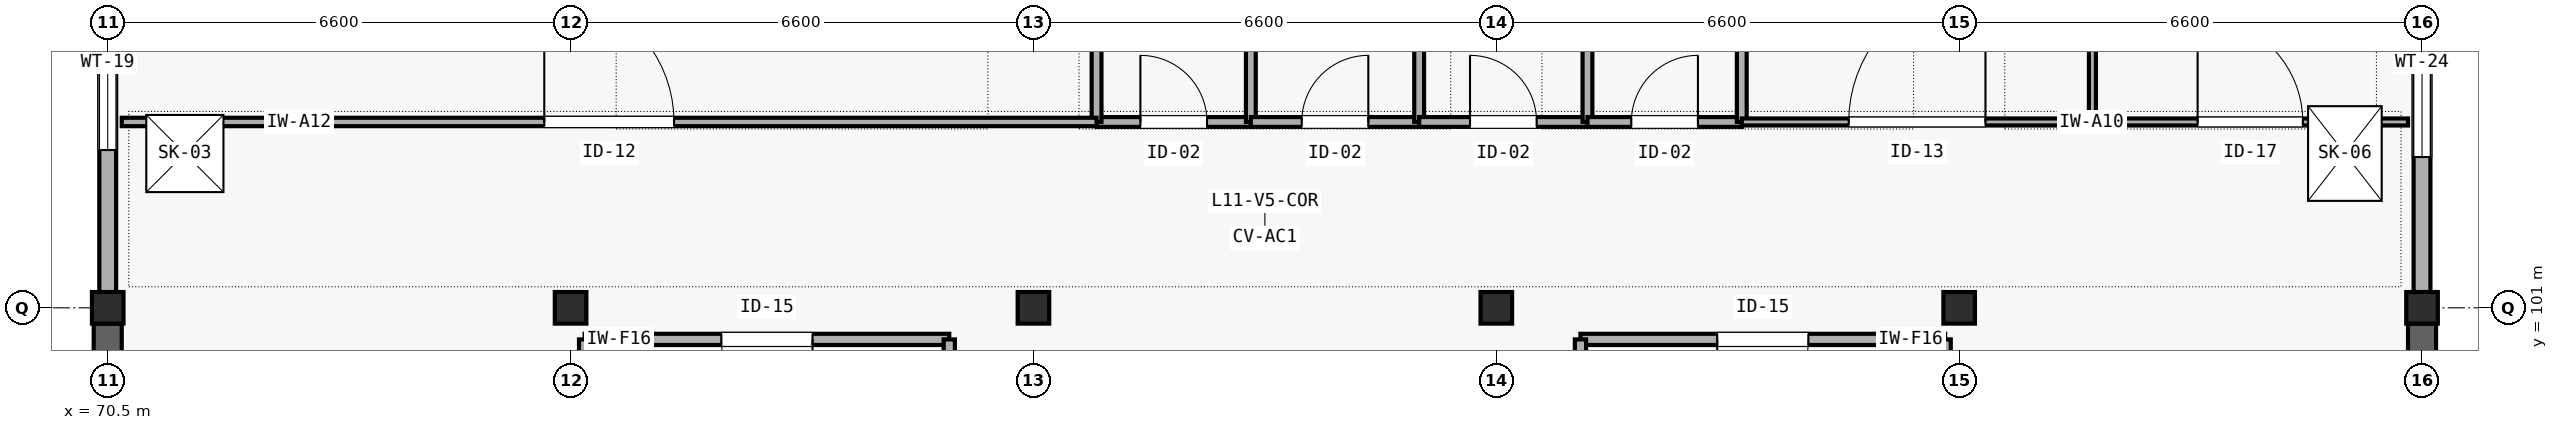
"""IFC4 building model, lengths in metres.
Left out: names, types, materials, properties, quantities, classifications, styles, units other than length and angle.
Written with IfcOpenShell. Run it as: python <this file> out.ifc"""

import sys

from ifc_helpers import new_model, si_unit, direction, frame, frame_2d, origin, origin_2d, place, context, subcontext, project, spatial, rectangle, extrude, element, fill, save


model = new_model("IFC4")
c1 = context("Model", 3, precision=1e-05, world=origin(), true_north=direction((0.0, 1.0)))
c2 = subcontext(c1, "Body", "Model", "MODEL_VIEW")
j1 = project(units=[si_unit("LENGTHUNIT", "METRE"), si_unit("PLANEANGLEUNIT", "RADIAN")], contexts=[c1])
p1 = place(None, origin())
s1 = spatial("IfcSite", under=j1, at=p1, CompositionType="ELEMENT")
p2 = place(p1, origin())
s2 = spatial("IfcBuilding", under=s1, at=p2, CompositionType="ELEMENT")
p3 = place(p2, frame((0.0, 0.0, 46.2)))
s3 = spatial("IfcBuildingStorey", under=s2, at=p3, CompositionType="ELEMENT", Elevation=46.2)
for number, where, z_axis, x_axis in (
    (1, (70.5, 101.0, 0.0), (0.0, 0.0, 1.0), (1.0, 0.0, 0.0)),
    (2, (77.1, 101.0, 0.0), (0.0, 0.0, 1.0), (1.0, 0.0, 0.0)),
    (3, (83.7, 101.0, 0.0), (0.0, 0.0, 1.0), (1.0, 0.0, 0.0)),
    (4, (90.3, 101.0, 0.0), (0.0, 0.0, 1.0), (1.0, 0.0, 0.0)),
    (5, (96.9, 101.0, 0.0), (0.0, 0.0, 1.0), (1.0, 0.0, 0.0)),
    (6, (103.5, 101.0, 0.0), (0.0, 0.0, 1.0), (1.0, 0.0, 0.0)),
):
    element("IfcColumn", number, at=place(p3, frame(where, z_axis=z_axis, x_axis=x_axis)), inside=s3, PredefinedType="COLUMN", context=c2, shape_type="SweptSolid", body=[
        extrude(rectangle(XDim=0.45, YDim=0.45, at=origin_2d()), origin(), (0.0, 0.0, 1.0), 4.2),
    ])
p4 = place(p3, frame((70.5, 97.96, 0.0), z_axis=(0.0, 0.0, 1.0), x_axis=(0.0, 1.0, 0.0)))
e7 = element("IfcWall", 7, at=p4, inside=s3, PredefinedType="SHEAR", context=c2, shape_type="SweptSolid", body=[
    extrude(rectangle(XDim=2.815, YDim=0.4, at=frame_2d((1.407, 0.0))), origin(), (0.0, 0.0, 1.0), 3.85),
])
p5 = place(p3, frame((70.5, 101.225, 0.0), z_axis=(0.0, 0.0, 1.0), x_axis=(0.0, 1.0, 0.0)))
e8 = element("IfcWall", 8, at=p5, inside=s3, PredefinedType="SOLIDWALL", context=c2, shape_type="SweptSolid", body=[
    extrude(rectangle(XDim=6.55, YDim=0.24, at=frame_2d((3.275, 0.0))), origin(), (0.0, 0.0, 1.0), 3.313),
])
p6 = place(p5, frame((2.025, 0.0, 0.85)))
e9 = element("IfcOpeningElement", 9, at=p6, cuts=e8, PredefinedType="OPENING", context=c2, shape_type="SweptSolid", body=[
    extrude(rectangle(XDim=2.5, YDim=1.25, at=frame_2d((1.25, 0.625))), frame((0.0, 0.13, 0.0), z_axis=(0.0, -1.0, 0.0), x_axis=(1.0, 0.0, 0.0)), (0.0, 0.0, 1.0), 0.26),
])
p7 = place(p3, frame((103.5, 97.96, 0.0), z_axis=(0.0, 0.0, 1.0), x_axis=(0.0, 1.0, 0.0)))
e10 = element("IfcWall", 10, at=p7, inside=s3, PredefinedType="SHEAR", context=c2, shape_type="SweptSolid", body=[
    extrude(rectangle(XDim=2.815, YDim=0.4, at=frame_2d((1.407, 0.0))), origin(), (0.0, 0.0, 1.0), 3.85),
])
p8 = place(p3, frame((103.5, 101.225, 0.0), z_axis=(0.0, 0.0, 1.0), x_axis=(0.0, 1.0, 0.0)))
e11 = element("IfcWall", 11, at=p8, inside=s3, PredefinedType="SOLIDWALL", context=c2, shape_type="SweptSolid", body=[
    extrude(rectangle(XDim=6.55, YDim=0.24, at=frame_2d((3.275, 0.0))), origin(), (0.0, 0.0, 1.0), 3.247),
])
p9 = place(p8, frame((1.925, 0.0, 0.85)))
e12 = element("IfcOpeningElement", 12, at=p9, cuts=e11, PredefinedType="OPENING", context=c2, shape_type="SweptSolid", body=[
    extrude(rectangle(XDim=2.7, YDim=1.6, at=frame_2d((1.35, 0.8))), frame((0.0, 0.13, 0.0), z_axis=(0.0, -1.0, 0.0), x_axis=(1.0, 0.0, 0.0)), (0.0, 0.0, 1.0), 0.26),
])
p10 = place(p3, frame((77.3, 100.55, 0.0), z_axis=(0.0, 0.0, 1.0), x_axis=(1.0, 0.0, 0.0)))
e13 = element("IfcWall", 13, at=p10, inside=s3, PredefinedType="SOLIDWALL", context=c2, shape_type="SweptSolid", body=[
    extrude(rectangle(XDim=5.2, YDim=0.16, at=frame_2d((2.6, 0.0))), origin(), (0.0, 0.0, 1.0), 3.9),
])
p11 = place(p10, frame((1.95, 0.0, 0.0)))
e14 = element("IfcOpeningElement", 14, at=p11, cuts=e13, PredefinedType="OPENING", context=c2, shape_type="SweptSolid", body=[
    extrude(rectangle(XDim=1.3, YDim=2.15, at=frame_2d((0.65, 1.075))), frame((0.0, 0.09, 0.0), z_axis=(0.0, -1.0, 0.0), x_axis=(1.0, 0.0, 0.0)), (0.0, 0.0, 1.0), 0.18),
])
p12 = place(p3, frame((77.3, 97.5, 0.0), z_axis=(0.0, 0.0, 1.0), x_axis=(0.0, 1.0, 0.0)))
e15 = element("IfcWall", 15, at=p12, inside=s3, PredefinedType="SOLIDWALL", context=c2, shape_type="SweptSolid", body=[
    extrude(rectangle(XDim=3.05, YDim=0.16, at=frame_2d((1.525, 0.0))), origin(), (0.0, 0.0, 1.0), 3.405),
])
p13 = place(p3, frame((82.5, 97.5, 0.0), z_axis=(0.0, 0.0, 1.0), x_axis=(0.0, 1.0, 0.0)))
e16 = element("IfcWall", 16, at=p13, inside=s3, PredefinedType="SOLIDWALL", context=c2, shape_type="SweptSolid", body=[
    extrude(rectangle(XDim=3.05, YDim=0.16, at=frame_2d((1.525, 0.0))), origin(), (0.0, 0.0, 1.0), 3.9),
])
p14 = place(p3, frame((91.5, 100.55, 0.0), z_axis=(0.0, 0.0, 1.0), x_axis=(1.0, 0.0, 0.0)))
e17 = element("IfcWall", 17, at=p14, inside=s3, PredefinedType="SOLIDWALL", context=c2, shape_type="SweptSolid", body=[
    extrude(rectangle(XDim=5.2, YDim=0.16, at=frame_2d((2.6, 0.0))), origin(), (0.0, 0.0, 1.0), 3.9),
])
p15 = place(p14, frame((1.95, 0.0, 0.0)))
e18 = element("IfcOpeningElement", 18, at=p15, cuts=e17, PredefinedType="OPENING", context=c2, shape_type="SweptSolid", body=[
    extrude(rectangle(XDim=1.3, YDim=2.15, at=frame_2d((0.65, 1.075))), frame((0.0, 0.09, 0.0), z_axis=(0.0, -1.0, 0.0), x_axis=(1.0, 0.0, 0.0)), (0.0, 0.0, 1.0), 0.18),
])
p16 = place(p3, frame((91.5, 97.5, 0.0), z_axis=(0.0, 0.0, 1.0), x_axis=(0.0, 1.0, 0.0)))
e19 = element("IfcWall", 19, at=p16, inside=s3, PredefinedType="SOLIDWALL", context=c2, shape_type="SweptSolid", body=[
    extrude(rectangle(XDim=3.05, YDim=0.16, at=frame_2d((1.525, 0.0))), origin(), (0.0, 0.0, 1.0), 3.9),
])
p17 = place(p3, frame((96.7, 97.5, 0.0), z_axis=(0.0, 0.0, 1.0), x_axis=(0.0, 1.0, 0.0)))
e20 = element("IfcWall", 20, at=p17, inside=s3, PredefinedType="SOLIDWALL", context=c2, shape_type="SweptSolid", body=[
    extrude(rectangle(XDim=3.05, YDim=0.16, at=frame_2d((1.525, 0.0))), origin(), (0.0, 0.0, 1.0), 3.405),
])
p18 = place(p3, frame((84.6, 103.65, 0.0), z_axis=(0.0, 0.0, 1.0), x_axis=(1.0, 0.0, 0.0)))
e21 = element("IfcWall", 21, at=p18, inside=s3, PredefinedType="PLUMBINGWALL", context=c2, shape_type="SweptSolid", body=[
    extrude(rectangle(XDim=2.2, YDim=0.14, at=frame_2d((1.1, 0.0))), origin(), (0.0, 0.0, 1.0), 3.9),
])
p19 = place(p18, frame((0.625, 0.0, 0.0)))
e22 = element("IfcOpeningElement", 22, at=p19, cuts=e21, PredefinedType="OPENING", context=c2, shape_type="SweptSolid", body=[
    extrude(rectangle(XDim=0.95, YDim=2.1, at=frame_2d((0.475, 1.05))), frame((0.0, 0.08, 0.0), z_axis=(0.0, -1.0, 0.0), x_axis=(1.0, 0.0, 0.0)), (0.0, 0.0, 1.0), 0.16),
])
for number, where, z_axis, x_axis in (
    (23, (84.6, 103.65, 0.0), (0.0, 0.0, 1.0), (0.0, 1.0, 0.0)),
    (24, (86.8, 103.65, 0.0), (0.0, 0.0, 1.0), (0.0, 1.0, 0.0)),
):
    element("IfcWall", number, at=place(p3, frame(where, z_axis=z_axis, x_axis=x_axis)), inside=s3, PredefinedType="PLUMBINGWALL", context=c2, shape_type="SweptSolid", body=[
        extrude(rectangle(XDim=4.15, YDim=0.14, at=frame_2d((2.075, 0.0))), origin(), (0.0, 0.0, 1.0), 3.9),
    ])
p20 = place(p3, frame((86.8, 103.65, 0.0), z_axis=(0.0, 0.0, 1.0), x_axis=(1.0, 0.0, 0.0)))
e25 = element("IfcWall", 25, at=p20, inside=s3, PredefinedType="PLUMBINGWALL", context=c2, shape_type="SweptSolid", body=[
    extrude(rectangle(XDim=2.4, YDim=0.14, at=frame_2d((1.2, 0.0))), origin(), (0.0, 0.0, 1.0), 3.9),
])
p21 = place(p20, frame((0.725, 0.0, 0.0)))
e26 = element("IfcOpeningElement", 26, at=p21, cuts=e25, PredefinedType="OPENING", context=c2, shape_type="SweptSolid", body=[
    extrude(rectangle(XDim=0.95, YDim=2.1, at=frame_2d((0.475, 1.05))), frame((0.0, 0.08, 0.0), z_axis=(0.0, -1.0, 0.0), x_axis=(1.0, 0.0, 0.0)), (0.0, 0.0, 1.0), 0.16),
])
p22 = place(p3, frame((89.2, 103.65, 0.0), z_axis=(0.0, 0.0, 1.0), x_axis=(0.0, 1.0, 0.0)))
e27 = element("IfcWall", 27, at=p22, inside=s3, PredefinedType="PLUMBINGWALL", context=c2, shape_type="SweptSolid", body=[
    extrude(rectangle(XDim=4.15, YDim=0.14, at=frame_2d((2.075, 0.0))), origin(), (0.0, 0.0, 1.0), 3.9),
])
p23 = place(p3, frame((89.2, 103.65, 0.0), z_axis=(0.0, 0.0, 1.0), x_axis=(1.0, 0.0, 0.0)))
e28 = element("IfcWall", 28, at=p23, inside=s3, PredefinedType="PLUMBINGWALL", context=c2, shape_type="SweptSolid", body=[
    extrude(rectangle(XDim=2.4, YDim=0.14, at=frame_2d((1.2, 0.0))), origin(), (0.0, 0.0, 1.0), 3.9),
])
p24 = place(p23, frame((0.725, 0.0, 0.0)))
e29 = element("IfcOpeningElement", 29, at=p24, cuts=e28, PredefinedType="OPENING", context=c2, shape_type="SweptSolid", body=[
    extrude(rectangle(XDim=0.95, YDim=2.1, at=frame_2d((0.475, 1.05))), frame((0.0, 0.08, 0.0), z_axis=(0.0, -1.0, 0.0), x_axis=(1.0, 0.0, 0.0)), (0.0, 0.0, 1.0), 0.16),
])
p25 = place(p3, frame((91.6, 103.65, 0.0), z_axis=(0.0, 0.0, 1.0), x_axis=(0.0, 1.0, 0.0)))
e30 = element("IfcWall", 30, at=p25, inside=s3, PredefinedType="PLUMBINGWALL", context=c2, shape_type="SweptSolid", body=[
    extrude(rectangle(XDim=4.15, YDim=0.14, at=frame_2d((2.075, 0.0))), origin(), (0.0, 0.0, 1.0), 3.9),
])
p26 = place(p3, frame((91.6, 103.65, 0.0), z_axis=(0.0, 0.0, 1.0), x_axis=(1.0, 0.0, 0.0)))
e31 = element("IfcWall", 31, at=p26, inside=s3, PredefinedType="PLUMBINGWALL", context=c2, shape_type="SweptSolid", body=[
    extrude(rectangle(XDim=2.2, YDim=0.14, at=frame_2d((1.1, 0.0))), origin(), (0.0, 0.0, 1.0), 3.9),
])
p27 = place(p26, frame((0.625, 0.0, 0.0)))
e32 = element("IfcOpeningElement", 32, at=p27, cuts=e31, PredefinedType="OPENING", context=c2, shape_type="SweptSolid", body=[
    extrude(rectangle(XDim=0.95, YDim=2.1, at=frame_2d((0.475, 1.05))), frame((0.0, 0.08, 0.0), z_axis=(0.0, -1.0, 0.0), x_axis=(1.0, 0.0, 0.0)), (0.0, 0.0, 1.0), 0.16),
])
p28 = place(p3, frame((93.8, 103.65, 0.0), z_axis=(0.0, 0.0, 1.0), x_axis=(0.0, 1.0, 0.0)))
e33 = element("IfcWall", 33, at=p28, inside=s3, PredefinedType="PLUMBINGWALL", context=c2, shape_type="SweptSolid", body=[
    extrude(rectangle(XDim=4.15, YDim=0.14, at=frame_2d((2.075, 0.0))), origin(), (0.0, 0.0, 1.0), 3.9),
])
p29 = place(p3, frame((70.7, 103.65, 0.0), z_axis=(0.0, 0.0, 1.0), x_axis=(1.0, 0.0, 0.0)))
e34 = element("IfcWall", 34, at=p29, inside=s3, PredefinedType="PARTITIONING", context=c2, shape_type="SweptSolid", body=[
    extrude(rectangle(XDim=13.9, YDim=0.12, at=frame_2d((6.95, 0.0))), origin(), (0.0, 0.0, 1.0), 3.9),
])
p30 = place(p29, frame((6.025, 0.0, 0.0)))
e35 = element("IfcOpeningElement", 35, at=p30, cuts=e34, PredefinedType="OPENING", context=c2, shape_type="SweptSolid", body=[
    extrude(rectangle(XDim=1.85, YDim=2.3, at=frame_2d((0.925, 1.15))), frame((0.0, 0.07, 0.0), z_axis=(0.0, -1.0, 0.0), x_axis=(1.0, 0.0, 0.0)), (0.0, 0.0, 1.0), 0.14),
])
p31 = place(p3, frame((93.8, 103.65, 0.0), z_axis=(0.0, 0.0, 1.0), x_axis=(1.0, 0.0, 0.0)))
e36 = element("IfcWall", 36, at=p31, inside=s3, PredefinedType="PARTITIONING", context=c2, shape_type="SweptSolid", body=[
    extrude(rectangle(XDim=5.0, YDim=0.1, at=frame_2d((2.5, 0.0))), origin(), (0.0, 0.0, 1.0), 3.9),
])
p32 = place(p31, frame((1.525, 0.0, 0.0)))
e37 = element("IfcOpeningElement", 37, at=p32, cuts=e36, PredefinedType="OPENING", context=c2, shape_type="SweptSolid", body=[
    extrude(rectangle(XDim=1.95, YDim=2.3, at=frame_2d((0.975, 1.15))), frame((0.0, 0.06, 0.0), z_axis=(0.0, -1.0, 0.0), x_axis=(1.0, 0.0, 0.0)), (0.0, 0.0, 1.0), 0.12),
])
p33 = place(p3, frame((98.8, 103.65, 0.0), z_axis=(0.0, 0.0, 1.0), x_axis=(0.0, 1.0, 0.0)))
e38 = element("IfcWall", 38, at=p33, inside=s3, PredefinedType="PARTITIONING", context=c2, shape_type="SweptSolid", body=[
    extrude(rectangle(XDim=11.15, YDim=0.1, at=frame_2d((5.575, 0.0))), origin(), (0.0, 0.0, 1.0), 3.9),
])
p34 = place(p3, frame((98.8, 103.65, 0.0), z_axis=(0.0, 0.0, 1.0), x_axis=(1.0, 0.0, 0.0)))
e39 = element("IfcWall", 39, at=p34, inside=s3, PredefinedType="PARTITIONING", context=c2, shape_type="SweptSolid", body=[
    extrude(rectangle(XDim=4.5, YDim=0.1, at=frame_2d((2.25, 0.0))), origin(), (0.0, 0.0, 1.0), 3.9),
])
p35 = place(p34, frame((1.5, 0.0, 0.0)))
e40 = element("IfcOpeningElement", 40, at=p35, cuts=e39, PredefinedType="OPENING", context=c2, shape_type="SweptSolid", body=[
    extrude(rectangle(XDim=1.5, YDim=2.15, at=frame_2d((0.75, 1.075))), frame((0.0, 0.06, 0.0), z_axis=(0.0, -1.0, 0.0), x_axis=(1.0, 0.0, 0.0)), (0.0, 0.0, 1.0), 0.12),
])
p36 = place(p6, origin())
e41 = element("IfcWindow", 41, at=p36, inside=s3, PartitioningType="SINGLE_PANEL", PredefinedType="WINDOW", context=c2, shape_type="SweptSolid", body=[
    extrude(rectangle(XDim=2.5, YDim=1.25, at=frame_2d((1.25, 0.625))), frame((0.0, 0.03, 0.0), z_axis=(0.0, -1.0, 0.0), x_axis=(1.0, 0.0, 0.0)), (0.0, 0.0, 1.0), 0.06),
])
fill(e9, e41)
p37 = place(p9, origin())
e42 = element("IfcWindow", 42, at=p37, inside=s3, PartitioningType="SINGLE_PANEL", PredefinedType="WINDOW", context=c2, shape_type="SweptSolid", body=[
    extrude(rectangle(XDim=2.7, YDim=1.6, at=frame_2d((1.35, 0.8))), frame((0.0, 0.03, 0.0), z_axis=(0.0, -1.0, 0.0), x_axis=(1.0, 0.0, 0.0)), (0.0, 0.0, 1.0), 0.06),
])
fill(e12, e42)
p38 = place(p2, frame((0.0, 0.0, 50.4)))
p39 = place(p38, frame((0.0, 0.0, -0.26)))
p40 = place(p39, frame((71.6, 103.2, 0.21)))
e43 = element("IfcWindow", 43, at=p40, inside=s3, PartitioningType="SINGLE_PANEL", PredefinedType="SKYLIGHT", context=c2, shape_type="SweptSolid", body=[
    extrude(rectangle(XDim=1.1, YDim=1.1, at=origin_2d()), origin(), (0.0, 0.0, 1.0), 0.05),
])
p41 = place(p39, frame((102.4, 103.2, 0.21)))
e44 = element("IfcWindow", 44, at=p41, inside=s3, PartitioningType="SINGLE_PANEL", PredefinedType="SKYLIGHT", context=c2, shape_type="SweptSolid", body=[
    extrude(rectangle(XDim=1.05, YDim=1.35, at=origin_2d()), origin(), (0.0, 0.0, 1.0), 0.05),
])
p42 = place(p11, frame((1.3, 0.0, 0.0), z_axis=(0.0, 0.0, 1.0), x_axis=(-1.0, 0.0, 0.0)))
e45 = element("IfcDoor", 45, at=p42, inside=s3, OperationType="SINGLE_SWING_LEFT", PredefinedType="DOOR", context=c2, shape_type="SweptSolid", body=[
    extrude(rectangle(XDim=1.3, YDim=2.15, at=frame_2d((0.65, 1.075))), frame((0.0, 0.025, 0.0), z_axis=(0.0, -1.0, 0.0), x_axis=(1.0, 0.0, 0.0)), (0.0, 0.0, 1.0), 0.05),
])
fill(e14, e45)
p43 = place(p15, frame((1.3, 0.0, 0.0), z_axis=(0.0, 0.0, 1.0), x_axis=(-1.0, 0.0, 0.0)))
e46 = element("IfcDoor", 46, at=p43, inside=s3, OperationType="SINGLE_SWING_RIGHT", PredefinedType="DOOR", context=c2, shape_type="SweptSolid", body=[
    extrude(rectangle(XDim=1.3, YDim=2.15, at=frame_2d((0.65, 1.075))), frame((0.0, 0.025, 0.0), z_axis=(0.0, -1.0, 0.0), x_axis=(1.0, 0.0, 0.0)), (0.0, 0.0, 1.0), 0.05),
])
fill(e18, e46)
p44 = place(p19, origin())
e47 = element("IfcDoor", 47, at=p44, inside=s3, OperationType="SINGLE_SWING_LEFT", PredefinedType="DOOR", context=c2, shape_type="SweptSolid", body=[
    extrude(rectangle(XDim=0.95, YDim=2.1, at=frame_2d((0.475, 1.05))), frame((0.0, 0.025, 0.0), z_axis=(0.0, -1.0, 0.0), x_axis=(1.0, 0.0, 0.0)), (0.0, 0.0, 1.0), 0.05),
])
fill(e22, e47)
p45 = place(p21, origin())
e48 = element("IfcDoor", 48, at=p45, inside=s3, OperationType="SINGLE_SWING_RIGHT", PredefinedType="DOOR", context=c2, shape_type="SweptSolid", body=[
    extrude(rectangle(XDim=0.95, YDim=2.1, at=frame_2d((0.475, 1.05))), frame((0.0, 0.025, 0.0), z_axis=(0.0, -1.0, 0.0), x_axis=(1.0, 0.0, 0.0)), (0.0, 0.0, 1.0), 0.05),
])
fill(e26, e48)
p46 = place(p24, origin())
e49 = element("IfcDoor", 49, at=p46, inside=s3, OperationType="SINGLE_SWING_LEFT", PredefinedType="DOOR", context=c2, shape_type="SweptSolid", body=[
    extrude(rectangle(XDim=0.95, YDim=2.1, at=frame_2d((0.475, 1.05))), frame((0.0, 0.025, 0.0), z_axis=(0.0, -1.0, 0.0), x_axis=(1.0, 0.0, 0.0)), (0.0, 0.0, 1.0), 0.05),
])
fill(e29, e49)
p47 = place(p27, origin())
e50 = element("IfcDoor", 50, at=p47, inside=s3, OperationType="SINGLE_SWING_RIGHT", PredefinedType="DOOR", context=c2, shape_type="SweptSolid", body=[
    extrude(rectangle(XDim=0.95, YDim=2.1, at=frame_2d((0.475, 1.05))), frame((0.0, 0.025, 0.0), z_axis=(0.0, -1.0, 0.0), x_axis=(1.0, 0.0, 0.0)), (0.0, 0.0, 1.0), 0.05),
])
fill(e32, e50)
p48 = place(p30, origin())
e51 = element("IfcDoor", 51, at=p48, inside=s3, OperationType="SINGLE_SWING_LEFT", PredefinedType="DOOR", context=c2, shape_type="SweptSolid", body=[
    extrude(rectangle(XDim=1.85, YDim=2.3, at=frame_2d((0.925, 1.15))), frame((0.0, 0.025, 0.0), z_axis=(0.0, -1.0, 0.0), x_axis=(1.0, 0.0, 0.0)), (0.0, 0.0, 1.0), 0.05),
])
fill(e35, e51)
p49 = place(p32, origin())
e52 = element("IfcDoor", 52, at=p49, inside=s3, OperationType="SINGLE_SWING_RIGHT", PredefinedType="DOOR", context=c2, shape_type="SweptSolid", body=[
    extrude(rectangle(XDim=1.95, YDim=2.3, at=frame_2d((0.975, 1.15))), frame((0.0, 0.025, 0.0), z_axis=(0.0, -1.0, 0.0), x_axis=(1.0, 0.0, 0.0)), (0.0, 0.0, 1.0), 0.05),
])
fill(e37, e52)
p50 = place(p35, origin())
e53 = element("IfcDoor", 53, at=p50, inside=s3, OperationType="SINGLE_SWING_LEFT", PredefinedType="DOOR", context=c2, shape_type="SweptSolid", body=[
    extrude(rectangle(XDim=1.5, YDim=2.15, at=frame_2d((0.75, 1.075))), frame((0.0, 0.025, 0.0), z_axis=(0.0, -1.0, 0.0), x_axis=(1.0, 0.0, 0.0)), (0.0, 0.0, 1.0), 0.05),
])
fill(e40, e53)
save(model, sys.argv[1])
